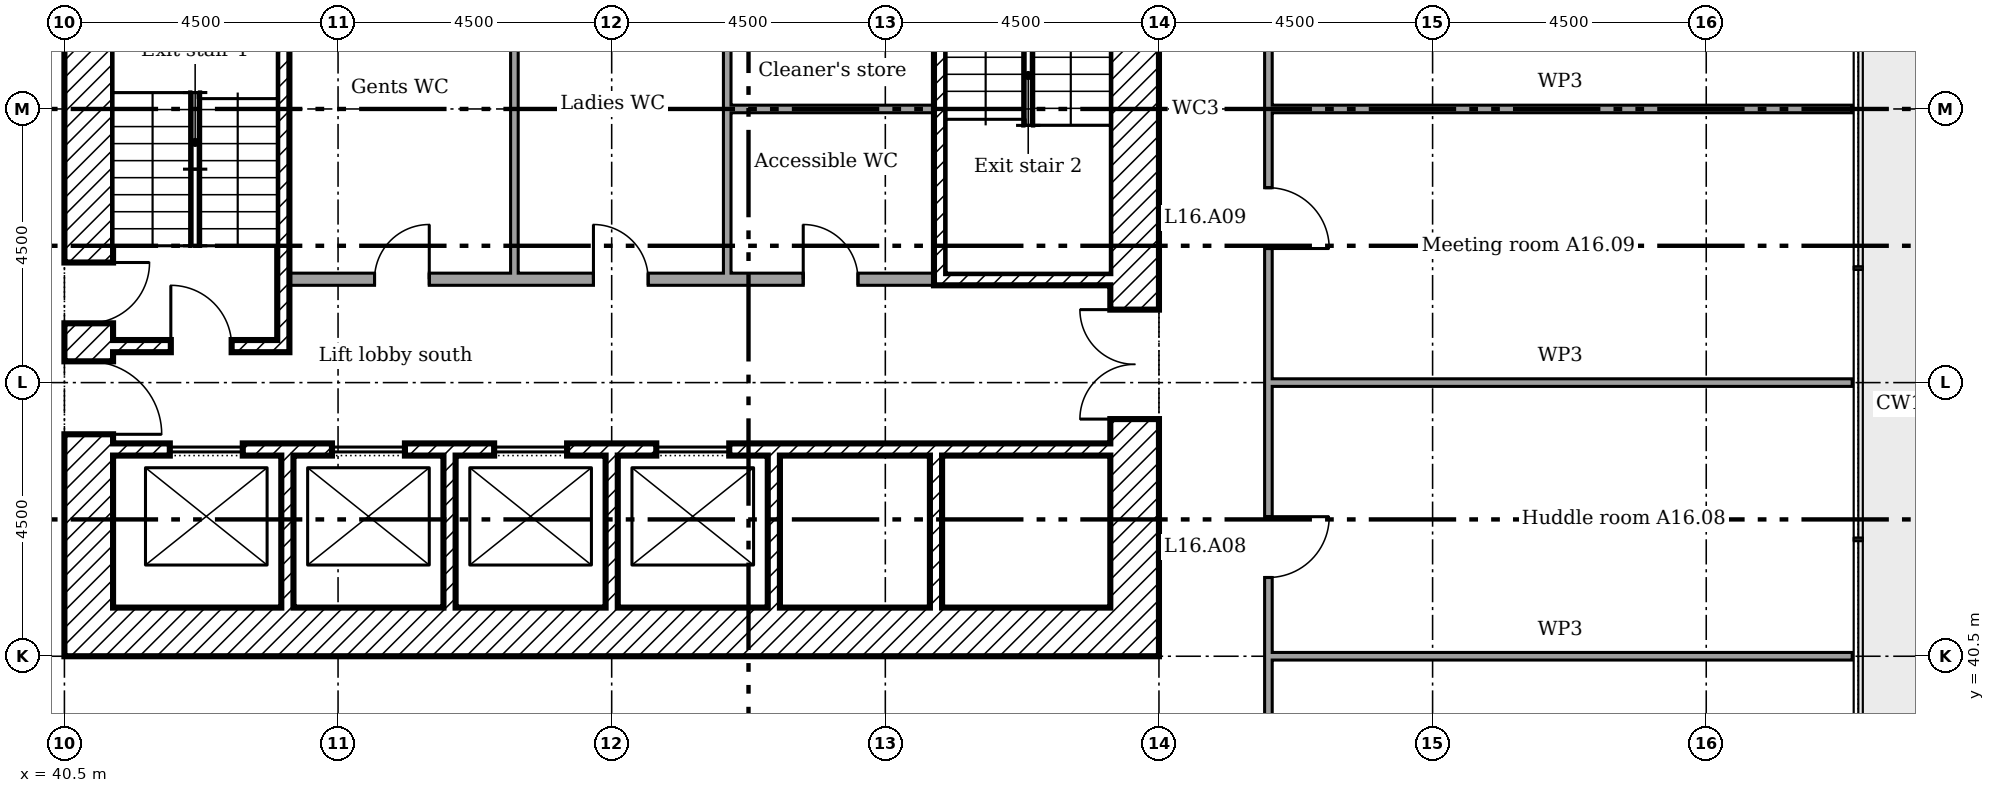
"""IFC4 building model, lengths in metres.
Left out: names, types, materials, properties, quantities, classifications, styles, units other than length and angle.
Written with IfcOpenShell. Run it as: python <this file> out.ifc"""

import sys

from ifc_helpers import new_model, si_unit, direction, frame, frame_2d, origin, place, context, subcontext, project, spatial, rectangle, extrude, element, fill, save


model = new_model("IFC4")
c1 = context("Model", 3, precision=1e-05, world=origin(), true_north=direction((0.0, 1.0)))
c2 = subcontext(c1, "Body", "Model", "MODEL_VIEW")
j1 = project(units=[si_unit("LENGTHUNIT", "METRE"), si_unit("PLANEANGLEUNIT", "RADIAN")], contexts=[c1])
p1 = place(None, origin())
s1 = spatial("IfcSite", under=j1, at=p1, CompositionType="ELEMENT")
p2 = place(p1, origin())
s2 = spatial("IfcBuilding", under=s1, at=p2, CompositionType="ELEMENT")
p3 = place(p2, frame((0.0, 0.0, 69.0)))
s3 = spatial("IfcBuildingStorey", under=s2, at=p3, CompositionType="ELEMENT", Elevation=69.0)
p4 = place(p3, frame((58.1, 40.5, 0.0), z_axis=(0.0, 0.0, 1.0), x_axis=(0.0, 1.0, 0.0)))
e1 = element("IfcWall", 1, at=p4, inside=s3, PredefinedType="SHEAR", context=c2, shape_type="SweptSolid", body=[
    extrude(rectangle(XDim=18.0, YDim=0.8, at=frame_2d((9.0, 0.0))), origin(), (0.0, 0.0, 1.0), 3.35),
])
p5 = place(p4, frame((13.15, 0.0, 0.0)))
e2 = element("IfcOpeningElement", 2, at=p5, cuts=e1, PredefinedType="OPENING", context=c2, shape_type="SweptSolid", body=[
    extrude(rectangle(XDim=1.2, YDim=2.1, at=frame_2d((0.6, 1.05))), frame((0.0, 0.41, 0.0), z_axis=(0.0, -1.0, 0.0), x_axis=(1.0, 0.0, 0.0)), (0.0, 0.0, 1.0), 0.82),
])
p6 = place(p4, frame((3.9, 0.0, 0.0)))
e3 = element("IfcOpeningElement", 3, at=p6, cuts=e1, PredefinedType="OPENING", context=c2, shape_type="SweptSolid", body=[
    extrude(rectangle(XDim=1.8, YDim=2.1, at=frame_2d((0.9, 1.05))), frame((0.0, 0.41, 0.0), z_axis=(0.0, -1.0, 0.0), x_axis=(1.0, 0.0, 0.0)), (0.0, 0.0, 1.0), 0.82),
])
p7 = place(p4, frame((11.525, 0.0, 0.0)))
e4 = element("IfcOpeningElement", 4, at=p7, cuts=e1, PredefinedType="OPENING", context=c2, shape_type="SweptSolid", body=[
    extrude(rectangle(XDim=1.0, YDim=2.1, at=frame_2d((0.5, 1.05))), frame((0.0, 0.41, 0.0), z_axis=(0.0, -1.0, 0.0), x_axis=(1.0, 0.0, 0.0)), (0.0, 0.0, 1.0), 0.82),
])
p8 = place(p3, frame((41.3, 40.9, 0.0)))
e5 = element("IfcWall", 5, at=p8, inside=s3, PredefinedType="SHEAR", context=c2, shape_type="SweptSolid", body=[
    extrude(rectangle(XDim=16.4, YDim=0.8, at=frame_2d((8.2, 0.0))), origin(), (0.0, 0.0, 1.0), 3.35),
])
p9 = place(p3, frame((40.9, 40.5, 0.0), z_axis=(0.0, 0.0, 1.0), x_axis=(0.0, 1.0, 0.0)))
e6 = element("IfcWall", 6, at=p9, inside=s3, PredefinedType="SHEAR", context=c2, shape_type="SweptSolid", body=[
    extrude(rectangle(XDim=18.0, YDim=0.8, at=frame_2d((9.0, 0.0))), origin(), (0.0, 0.0, 1.0), 3.35),
])
p10 = place(p9, frame((3.65, 0.0, 0.0)))
e7 = element("IfcOpeningElement", 7, at=p10, cuts=e6, PredefinedType="OPENING", context=c2, shape_type="SweptSolid", body=[
    extrude(rectangle(XDim=1.2, YDim=2.1, at=frame_2d((0.6, 1.05))), frame((0.0, 0.41, 0.0), z_axis=(0.0, -1.0, 0.0), x_axis=(1.0, 0.0, 0.0)), (0.0, 0.0, 1.0), 0.82),
])
p11 = place(p9, frame((5.475, 0.0, 0.0)))
e8 = element("IfcOpeningElement", 8, at=p11, cuts=e6, PredefinedType="OPENING", context=c2, shape_type="SweptSolid", body=[
    extrude(rectangle(XDim=1.0, YDim=2.1, at=frame_2d((0.5, 1.05))), frame((0.0, 0.41, 0.0), z_axis=(0.0, -1.0, 0.0), x_axis=(1.0, 0.0, 0.0)), (0.0, 0.0, 1.0), 0.82),
])
p12 = place(p9, frame((12.3, 0.0, 0.0)))
e9 = element("IfcOpeningElement", 9, at=p12, cuts=e6, PredefinedType="OPENING", context=c2, shape_type="SweptSolid", body=[
    extrude(rectangle(XDim=1.0, YDim=2.1, at=frame_2d((0.5, 1.05))), frame((0.0, 0.41, 0.0), z_axis=(0.0, -1.0, 0.0), x_axis=(1.0, 0.0, 0.0)), (0.0, 0.0, 1.0), 0.82),
])
for number, where, z_axis, x_axis in (
    (10, (44.167, 41.3, 0.0), (0.0, 0.0, 1.0), (0.0, 1.0, 0.0)),
    (11, (46.833, 41.3, 0.0), (0.0, 0.0, 1.0), (0.0, 1.0, 0.0)),
    (12, (49.5, 41.3, 0.0), (0.0, 0.0, 1.0), (0.0, 1.0, 0.0)),
    (13, (52.167, 41.3, 0.0), (0.0, 0.0, 1.0), (0.0, 1.0, 0.0)),
    (14, (54.833, 41.3, 0.0), (0.0, 0.0, 1.0), (0.0, 1.0, 0.0)),
):
    element("IfcWall", number, at=place(p3, frame(where, z_axis=z_axis, x_axis=x_axis)), inside=s3, PredefinedType="SHEAR", context=c2, shape_type="SweptSolid", body=[
        extrude(rectangle(XDim=2.5, YDim=0.2, at=frame_2d((1.25, 0.0))), origin(), (0.0, 0.0, 1.0), 3.35),
    ])
p13 = place(p3, frame((41.3, 43.9, 0.0)))
e15 = element("IfcWall", 15, at=p13, inside=s3, PredefinedType="SHEAR", context=c2, shape_type="SweptSolid", body=[
    extrude(rectangle(XDim=16.4, YDim=0.2, at=frame_2d((8.2, 0.0))), origin(), (0.0, 0.0, 1.0), 3.35),
])
p14 = place(p13, frame((0.933, 0.0, 0.0)))
e16 = element("IfcOpeningElement", 16, at=p14, cuts=e15, PredefinedType="OPENING", context=c2, shape_type="SweptSolid", body=[
    extrude(rectangle(XDim=1.2, YDim=2.1, at=frame_2d((0.6, 1.05))), frame((0.0, 0.11, 0.0), z_axis=(0.0, -1.0, 0.0), x_axis=(1.0, 0.0, 0.0)), (0.0, 0.0, 1.0), 0.22),
])
p15 = place(p13, frame((3.6, 0.0, 0.0)))
e17 = element("IfcOpeningElement", 17, at=p15, cuts=e15, PredefinedType="OPENING", context=c2, shape_type="SweptSolid", body=[
    extrude(rectangle(XDim=1.2, YDim=2.1, at=frame_2d((0.6, 1.05))), frame((0.0, 0.11, 0.0), z_axis=(0.0, -1.0, 0.0), x_axis=(1.0, 0.0, 0.0)), (0.0, 0.0, 1.0), 0.22),
])
p16 = place(p13, frame((6.267, 0.0, 0.0)))
e18 = element("IfcOpeningElement", 18, at=p16, cuts=e15, PredefinedType="OPENING", context=c2, shape_type="SweptSolid", body=[
    extrude(rectangle(XDim=1.2, YDim=2.1, at=frame_2d((0.6, 1.05))), frame((0.0, 0.11, 0.0), z_axis=(0.0, -1.0, 0.0), x_axis=(1.0, 0.0, 0.0)), (0.0, 0.0, 1.0), 0.22),
])
p17 = place(p13, frame((8.933, 0.0, 0.0)))
e19 = element("IfcOpeningElement", 19, at=p17, cuts=e15, PredefinedType="OPENING", context=c2, shape_type="SweptSolid", body=[
    extrude(rectangle(XDim=1.2, YDim=2.1, at=frame_2d((0.6, 1.05))), frame((0.0, 0.11, 0.0), z_axis=(0.0, -1.0, 0.0), x_axis=(1.0, 0.0, 0.0)), (0.0, 0.0, 1.0), 0.22),
])
p18 = place(p3, frame((44.1, 45.5, 0.0), z_axis=(0.0, 0.0, 1.0), x_axis=(0.0, 1.0, 0.0)))
e20 = element("IfcWall", 20, at=p18, inside=s3, PredefinedType="SHEAR", context=c2, shape_type="SweptSolid", body=[
    extrude(rectangle(XDim=6.9, YDim=0.2, at=frame_2d((3.45, 0.0))), origin(), (0.0, 0.0, 1.0), 3.35),
])
p19 = place(p3, frame((41.3, 45.6, 0.0)))
e21 = element("IfcWall", 21, at=p19, inside=s3, PredefinedType="SHEAR", context=c2, shape_type="SweptSolid", body=[
    extrude(rectangle(XDim=2.7, YDim=0.2, at=frame_2d((1.35, 0.0))), origin(), (0.0, 0.0, 1.0), 3.35),
])
p20 = place(p19, frame((0.95, 0.0, 0.0)))
e22 = element("IfcOpeningElement", 22, at=p20, cuts=e21, PredefinedType="OPENING", context=c2, shape_type="SweptSolid", body=[
    extrude(rectangle(XDim=1.0, YDim=2.1, at=frame_2d((0.5, 1.05))), frame((0.0, 0.11, 0.0), z_axis=(0.0, -1.0, 0.0), x_axis=(1.0, 0.0, 0.0)), (0.0, 0.0, 1.0), 0.22),
])
p21 = place(p3, frame((54.8, 46.7, 0.0)))
e23 = element("IfcWall", 23, at=p21, inside=s3, PredefinedType="SHEAR", context=c2, shape_type="SweptSolid", body=[
    extrude(rectangle(XDim=2.9, YDim=0.2, at=frame_2d((1.45, 0.0))), origin(), (0.0, 0.0, 1.0), 3.35),
])
p22 = place(p3, frame((54.9, 46.8, 0.0), z_axis=(0.0, 0.0, 1.0), x_axis=(0.0, 1.0, 0.0)))
e24 = element("IfcWall", 24, at=p22, inside=s3, PredefinedType="SHEAR", context=c2, shape_type="SweptSolid", body=[
    extrude(rectangle(XDim=6.5, YDim=0.2, at=frame_2d((3.25, 0.0))), origin(), (0.0, 0.0, 1.0), 3.35),
])
p23 = place(p3, frame((44.2, 46.7, 0.0)))
e25 = element("IfcWall", 25, at=p23, inside=s3, PredefinedType="PARTITIONING", context=c2, shape_type="SweptSolid", body=[
    extrude(rectangle(XDim=10.6, YDim=0.2, at=frame_2d((5.3, 0.0))), origin(), (0.0, 0.0, 1.0), 3.35),
])
p24 = place(p23, frame((1.4, 0.0, 0.0)))
e26 = element("IfcOpeningElement", 26, at=p24, cuts=e25, PredefinedType="OPENING", context=c2, shape_type="SweptSolid", body=[
    extrude(rectangle(XDim=0.9, YDim=2.1, at=frame_2d((0.45, 1.05))), frame((0.0, 0.11, 0.0), z_axis=(0.0, -1.0, 0.0), x_axis=(1.0, 0.0, 0.0)), (0.0, 0.0, 1.0), 0.22),
])
p25 = place(p23, frame((5.0, 0.0, 0.0)))
e27 = element("IfcOpeningElement", 27, at=p25, cuts=e25, PredefinedType="OPENING", context=c2, shape_type="SweptSolid", body=[
    extrude(rectangle(XDim=0.9, YDim=2.1, at=frame_2d((0.45, 1.05))), frame((0.0, 0.11, 0.0), z_axis=(0.0, -1.0, 0.0), x_axis=(1.0, 0.0, 0.0)), (0.0, 0.0, 1.0), 0.22),
])
p26 = place(p23, frame((8.45, 0.0, 0.0)))
e28 = element("IfcOpeningElement", 28, at=p26, cuts=e25, PredefinedType="OPENING", context=c2, shape_type="SweptSolid", body=[
    extrude(rectangle(XDim=0.9, YDim=2.1, at=frame_2d((0.45, 1.05))), frame((0.0, 0.11, 0.0), z_axis=(0.0, -1.0, 0.0), x_axis=(1.0, 0.0, 0.0)), (0.0, 0.0, 1.0), 0.22),
])
p27 = place(p3, frame((47.9, 46.8, 0.0), z_axis=(0.0, 0.0, 1.0), x_axis=(0.0, 1.0, 0.0)))
e29 = element("IfcWall", 29, at=p27, inside=s3, PredefinedType="PARTITIONING", context=c2, shape_type="SweptSolid", body=[
    extrude(rectangle(XDim=5.0, YDim=0.125, at=frame_2d((2.5, 0.0))), origin(), (0.0, 0.0, 1.0), 3.35),
])
p28 = place(p3, frame((51.4, 46.8, 0.0), z_axis=(0.0, 0.0, 1.0), x_axis=(0.0, 1.0, 0.0)))
e30 = element("IfcWall", 30, at=p28, inside=s3, PredefinedType="PARTITIONING", context=c2, shape_type="SweptSolid", body=[
    extrude(rectangle(XDim=2.762, YDim=0.125, at=frame_2d((1.381, 0.0))), origin(), (0.0, 0.0, 1.0), 3.35),
])
p29 = place(p3, frame((54.8, 49.5, 0.0), z_axis=(0.0, 0.0, 1.0), x_axis=(-1.0, 0.0, 0.0)))
e31 = element("IfcWall", 31, at=p29, inside=s3, PredefinedType="PARTITIONING", context=c2, shape_type="SweptSolid", body=[
    extrude(rectangle(XDim=3.338, YDim=0.125, at=frame_2d((1.669, 0.0))), origin(), (0.0, 0.0, 1.0), 3.35),
])
p30 = place(p3, frame((51.4, 49.5, 0.0), z_axis=(0.0, 0.0, 1.0), x_axis=(0.0, 1.0, 0.0)))
e32 = element("IfcWall", 32, at=p30, inside=s3, PredefinedType="PARTITIONING", context=c2, shape_type="SweptSolid", body=[
    extrude(rectangle(XDim=2.3, YDim=0.125, at=frame_2d((1.15, 0.0))), origin(), (0.0, 0.0, 1.0), 3.35),
])
for number, where in (
    (33, (60.3, 40.5, 0.0)),
    (34, (60.3, 45.0, 0.0)),
    (35, (60.3, 49.5, 0.0)),
):
    element("IfcWall", number, at=place(p3, frame(where)), inside=s3, PredefinedType="MOVABLE", context=c2, shape_type="SweptSolid", body=[
        extrude(rectangle(XDim=9.6, YDim=0.125, at=frame_2d((4.8, 0.0))), origin(), (0.0, 0.0, 1.0), 2.766),
    ])
p31 = place(p3, frame((60.3, 38.762, 0.0), z_axis=(0.0, 0.0, 1.0), x_axis=(0.0, 1.0, 0.0)))
e36 = element("IfcWall", 36, at=p31, inside=s3, PredefinedType="PARTITIONING", context=c2, shape_type="SweptSolid", body=[
    extrude(rectangle(XDim=21.475, YDim=0.125, at=frame_2d((10.738, 0.0))), origin(), (0.0, 0.0, 1.0), 3.45),
])
p32 = place(p31, frame((3.032, 0.0, 0.0)))
e37 = element("IfcOpeningElement", 37, at=p32, cuts=e36, PredefinedType="OPENING", context=c2, shape_type="SweptSolid", body=[
    extrude(rectangle(XDim=1.0, YDim=2.1, at=frame_2d((0.5, 1.05))), frame((0.0, 0.073, 0.0), z_axis=(0.0, -1.0, 0.0), x_axis=(1.0, 0.0, 0.0)), (0.0, 0.0, 1.0), 0.145),
])
p33 = place(p31, frame((8.442, 0.0, 0.0)))
e38 = element("IfcOpeningElement", 38, at=p33, cuts=e36, PredefinedType="OPENING", context=c2, shape_type="SweptSolid", body=[
    extrude(rectangle(XDim=1.0, YDim=2.1, at=frame_2d((0.5, 1.05))), frame((0.0, 0.073, 0.0), z_axis=(0.0, -1.0, 0.0), x_axis=(1.0, 0.0, 0.0)), (0.0, 0.0, 1.0), 0.145),
])
p34 = place(p31, frame((12.488, 0.0, 0.0)))
e39 = element("IfcOpeningElement", 39, at=p34, cuts=e36, PredefinedType="OPENING", context=c2, shape_type="SweptSolid", body=[
    extrude(rectangle(XDim=1.0, YDim=2.1, at=frame_2d((0.5, 1.05))), frame((0.0, 0.073, 0.0), z_axis=(0.0, -1.0, 0.0), x_axis=(1.0, 0.0, 0.0)), (0.0, 0.0, 1.0), 0.145),
])
p35 = place(p31, frame((16.532, 0.0, 0.0)))
e40 = element("IfcOpeningElement", 40, at=p35, cuts=e36, PredefinedType="OPENING", context=c2, shape_type="SweptSolid", body=[
    extrude(rectangle(XDim=1.0, YDim=2.1, at=frame_2d((0.5, 1.05))), frame((0.0, 0.073, 0.0), z_axis=(0.0, -1.0, 0.0), x_axis=(1.0, 0.0, 0.0)), (0.0, 0.0, 1.0), 0.145),
])
p36 = place(p31, frame((20.258, 0.0, 0.0)))
e41 = element("IfcOpeningElement", 41, at=p36, cuts=e36, PredefinedType="OPENING", context=c2, shape_type="SweptSolid", body=[
    extrude(rectangle(XDim=0.9, YDim=2.1, at=frame_2d((0.45, 1.05))), frame((0.0, 0.073, 0.0), z_axis=(0.0, -1.0, 0.0), x_axis=(1.0, 0.0, 0.0)), (0.0, 0.0, 1.0), 0.145),
])
p37 = place(p6, origin())
e42 = element("IfcDoor", 42, at=p37, inside=s3, OperationType="DOUBLE_DOOR_SINGLE_SWING", PredefinedType="DOOR", context=c2, shape_type="SweptSolid", body=[
    extrude(rectangle(XDim=1.8, YDim=2.1, at=frame_2d((0.9, 1.05))), frame((0.0, 0.025, 0.0), z_axis=(0.0, -1.0, 0.0), x_axis=(1.0, 0.0, 0.0)), (0.0, 0.0, 1.0), 0.05),
])
fill(e3, e42)
p38 = place(p10, frame((1.2, 0.0, 0.0), x_axis=(-1.0, 0.0, 0.0)))
e43 = element("IfcDoor", 43, at=p38, inside=s3, OperationType="SINGLE_SWING_LEFT", PredefinedType="DOOR", context=c2, shape_type="SweptSolid", body=[
    extrude(rectangle(XDim=1.2, YDim=2.1, at=frame_2d((0.6, 1.05))), frame((0.0, 0.025, 0.0), z_axis=(0.0, -1.0, 0.0), x_axis=(1.0, 0.0, 0.0)), (0.0, 0.0, 1.0), 0.05),
])
fill(e7, e43)
p39 = place(p20, origin())
e44 = element("IfcDoor", 44, at=p39, inside=s3, OperationType="SINGLE_SWING_RIGHT", PredefinedType="DOOR", context=c2, shape_type="SweptSolid", body=[
    extrude(rectangle(XDim=1.0, YDim=2.1, at=frame_2d((0.5, 1.05))), frame((0.0, 0.025, 0.0), z_axis=(0.0, -1.0, 0.0), x_axis=(1.0, 0.0, 0.0)), (0.0, 0.0, 1.0), 0.05),
])
fill(e22, e44)
p40 = place(p11, frame((1.0, 0.0, 0.0), x_axis=(-1.0, 0.0, 0.0)))
e45 = element("IfcDoor", 45, at=p40, inside=s3, OperationType="SINGLE_SWING_RIGHT", PredefinedType="DOOR", context=c2, shape_type="SweptSolid", body=[
    extrude(rectangle(XDim=1.0, YDim=2.1, at=frame_2d((0.5, 1.05))), frame((0.0, 0.025, 0.0), z_axis=(0.0, -1.0, 0.0), x_axis=(1.0, 0.0, 0.0)), (0.0, 0.0, 1.0), 0.05),
])
fill(e8, e45)
p41 = place(p24, origin())
e46 = element("IfcDoor", 46, at=p41, inside=s3, OperationType="SINGLE_SWING_LEFT", PredefinedType="DOOR", context=c2, shape_type="SweptSolid", body=[
    extrude(rectangle(XDim=0.9, YDim=2.1, at=frame_2d((0.45, 1.05))), frame((0.0, 0.025, 0.0), z_axis=(0.0, -1.0, 0.0), x_axis=(1.0, 0.0, 0.0)), (0.0, 0.0, 1.0), 0.05),
])
fill(e26, e46)
p42 = place(p25, origin())
e47 = element("IfcDoor", 47, at=p42, inside=s3, OperationType="SINGLE_SWING_RIGHT", PredefinedType="DOOR", context=c2, shape_type="SweptSolid", body=[
    extrude(rectangle(XDim=0.9, YDim=2.1, at=frame_2d((0.45, 1.05))), frame((0.0, 0.025, 0.0), z_axis=(0.0, -1.0, 0.0), x_axis=(1.0, 0.0, 0.0)), (0.0, 0.0, 1.0), 0.05),
])
fill(e27, e47)
p43 = place(p26, origin())
e48 = element("IfcDoor", 48, at=p43, inside=s3, OperationType="SINGLE_SWING_RIGHT", PredefinedType="DOOR", context=c2, shape_type="SweptSolid", body=[
    extrude(rectangle(XDim=0.9, YDim=2.1, at=frame_2d((0.45, 1.05))), frame((0.0, 0.025, 0.0), z_axis=(0.0, -1.0, 0.0), x_axis=(1.0, 0.0, 0.0)), (0.0, 0.0, 1.0), 0.05),
])
fill(e28, e48)
p44 = place(p14, origin())
e49 = element("IfcDoor", 49, at=p44, inside=s3, OperationType="SLIDING_TO_LEFT", PredefinedType="DOOR", context=c2, shape_type="SweptSolid", body=[
    extrude(rectangle(XDim=1.2, YDim=2.1, at=frame_2d((0.6, 1.05))), frame((0.0, 0.025, 0.0), z_axis=(0.0, -1.0, 0.0), x_axis=(1.0, 0.0, 0.0)), (0.0, 0.0, 1.0), 0.05),
])
fill(e16, e49)
p45 = place(p15, origin())
e50 = element("IfcDoor", 50, at=p45, inside=s3, OperationType="SLIDING_TO_LEFT", PredefinedType="DOOR", context=c2, shape_type="SweptSolid", body=[
    extrude(rectangle(XDim=1.2, YDim=2.1, at=frame_2d((0.6, 1.05))), frame((0.0, 0.025, 0.0), z_axis=(0.0, -1.0, 0.0), x_axis=(1.0, 0.0, 0.0)), (0.0, 0.0, 1.0), 0.05),
])
fill(e17, e50)
p46 = place(p16, origin())
e51 = element("IfcDoor", 51, at=p46, inside=s3, OperationType="SLIDING_TO_LEFT", PredefinedType="DOOR", context=c2, shape_type="SweptSolid", body=[
    extrude(rectangle(XDim=1.2, YDim=2.1, at=frame_2d((0.6, 1.05))), frame((0.0, 0.025, 0.0), z_axis=(0.0, -1.0, 0.0), x_axis=(1.0, 0.0, 0.0)), (0.0, 0.0, 1.0), 0.05),
])
fill(e18, e51)
p47 = place(p17, origin())
e52 = element("IfcDoor", 52, at=p47, inside=s3, OperationType="SLIDING_TO_LEFT", PredefinedType="DOOR", context=c2, shape_type="SweptSolid", body=[
    extrude(rectangle(XDim=1.2, YDim=2.1, at=frame_2d((0.6, 1.05))), frame((0.0, 0.025, 0.0), z_axis=(0.0, -1.0, 0.0), x_axis=(1.0, 0.0, 0.0)), (0.0, 0.0, 1.0), 0.05),
])
fill(e19, e52)
p48 = place(p32, frame((1.0, 0.0, 0.0), x_axis=(-1.0, 0.0, 0.0)))
e53 = element("IfcDoor", 53, at=p48, inside=s3, OperationType="SINGLE_SWING_RIGHT", PredefinedType="DOOR", context=c2, shape_type="SweptSolid", body=[
    extrude(rectangle(XDim=1.0, YDim=2.1, at=frame_2d((0.5, 1.05))), frame((0.0, 0.025, 0.0), z_axis=(0.0, -1.0, 0.0), x_axis=(1.0, 0.0, 0.0)), (0.0, 0.0, 1.0), 0.05),
])
fill(e37, e53)
p49 = place(p33, frame((1.0, 0.0, 0.0), x_axis=(-1.0, 0.0, 0.0)))
e54 = element("IfcDoor", 54, at=p49, inside=s3, OperationType="SINGLE_SWING_LEFT", PredefinedType="DOOR", context=c2, shape_type="SweptSolid", body=[
    extrude(rectangle(XDim=1.0, YDim=2.1, at=frame_2d((0.5, 1.05))), frame((0.0, 0.025, 0.0), z_axis=(0.0, -1.0, 0.0), x_axis=(1.0, 0.0, 0.0)), (0.0, 0.0, 1.0), 0.05),
])
fill(e38, e54)
save(model, sys.argv[1])
